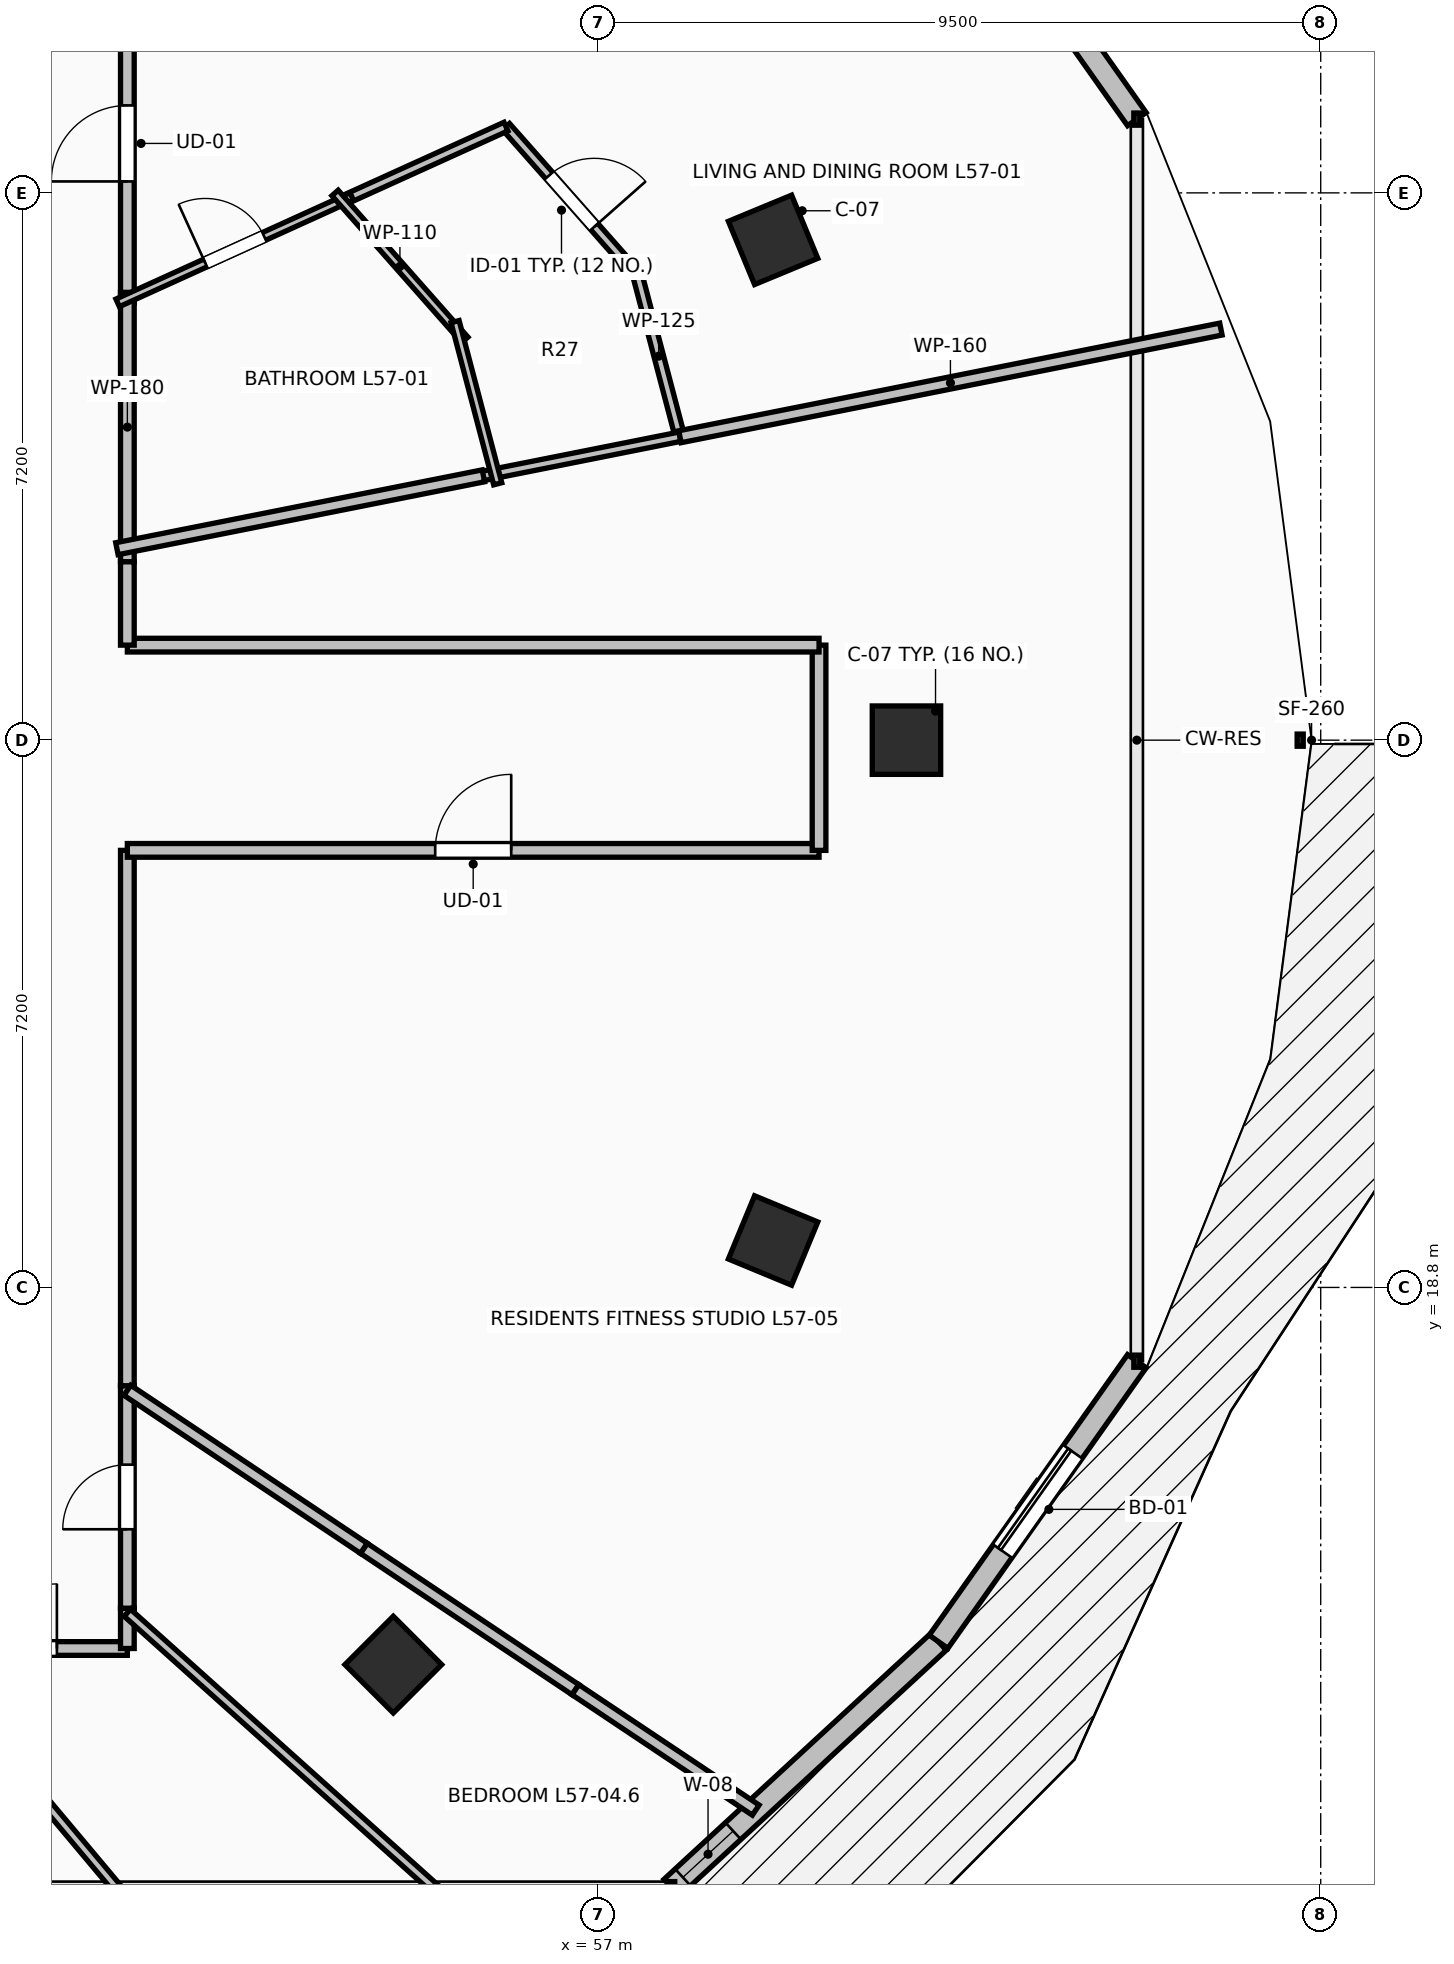
"""IFC4 building model, lengths in metres.
Left out: names, types, materials, properties, quantities, classifications, styles, units other than length and angle.
Written with IfcOpenShell. Run it as: python <this file> out.ifc"""

import sys

from ifc_helpers import new_model, si_unit, direction, frame, frame_2d, origin, origin_2d, place, context, subcontext, project, spatial, rectangle, extrude, element, fill, save


model = new_model("IFC4")
c1 = context("Model", 3, precision=1e-05, world=origin(), true_north=direction((0.0, 1.0)))
c2 = subcontext(c1, "Body", "Model", "MODEL_VIEW")
j1 = project(units=[si_unit("LENGTHUNIT", "METRE"), si_unit("PLANEANGLEUNIT", "RADIAN")], contexts=[c1])
p1 = place(None, origin())
s1 = spatial("IfcSite", under=j1, at=p1, CompositionType="ELEMENT")
p2 = place(p1, origin())
s2 = spatial("IfcBuilding", under=s1, at=p2, CompositionType="ELEMENT")
p3 = place(p2, frame((0.0, 0.0, 210.75)))
s3 = spatial("IfcBuildingStorey", under=s2, at=p3, CompositionType="ELEMENT", Elevation=210.75)
for number, where, z_axis, x_axis in (
    (1, (61.05, 26.0, 0.0), (0.0, 0.0, 1.0), (1.0, 0.0, 0.0)),
    (2, (59.295, 32.582, 0.0), (0.0, 0.0, 1.0), (0.924, 0.383, 0.0)),
    (3, (54.299, 13.838, 0.0), (0.0, 0.0, 1.0), (0.707, -0.707, 0.0)),
    (4, (59.295, 19.418, 0.0), (0.0, 0.0, 1.0), (0.924, -0.383, 0.0)),
):
    element("IfcColumn", number, at=place(p3, frame(where, z_axis=z_axis, x_axis=x_axis)), inside=s3, PredefinedType="COLUMN", context=c2, shape_type="SweptSolid", body=[
        extrude(rectangle(XDim=0.9, YDim=0.9, at=origin_2d()), origin(), (0.0, 0.0, 1.0), 3.55),
    ])
p4 = place(p3, frame((64.081, 34.17, 0.0), z_axis=(0.0, 0.0, 1.0), x_axis=(-0.577168747264, 0.81662490605, 0.0)))
e5 = element("IfcWall", 5, at=p4, inside=s3, PredefinedType="STANDARD", context=c2, shape_type="SweptSolid", body=[
    extrude(rectangle(XDim=4.52, YDim=0.3, at=frame_2d((2.26, 0.0))), origin(), (0.0, 0.0, 1.0), 3.29),
])
p5 = place(p3, frame((57.962, 10.903, 0.0), z_axis=(0.0, 0.0, 1.0), x_axis=(0.735359993374, 0.677676678177, 0.0)))
e6 = element("IfcWall", 6, at=p5, inside=s3, PredefinedType="STANDARD", context=c2, shape_type="SweptSolid", body=[
    extrude(rectangle(XDim=4.774, YDim=0.3, at=frame_2d((2.387, 0.0))), origin(), (0.0, 0.0, 1.0), 3.29),
])
p6 = place(p5, frame((0.2, 0.0, 0.85)))
e7 = element("IfcOpeningElement", 7, at=p6, cuts=e6, PredefinedType="OPENING", context=c2, shape_type="SweptSolid", body=[
    extrude(rectangle(XDim=0.9, YDim=1.8, at=frame_2d((0.45, 0.9))), frame((0.0, 0.165, 0.0), z_axis=(0.0, -1.0, 0.0), x_axis=(1.0, 0.0, 0.0)), (0.0, 0.0, 1.0), 0.33),
])
p7 = place(p3, frame((61.472, 14.139, 0.0), z_axis=(0.0, 0.0, 1.0), x_axis=(0.577168747264, 0.81662490605, 0.0)))
e8 = element("IfcWall", 8, at=p7, inside=s3, PredefinedType="STANDARD", context=c2, shape_type="SweptSolid", body=[
    extrude(rectangle(XDim=4.52, YDim=0.3, at=frame_2d((2.26, 0.0))), origin(), (0.0, 0.0, 1.0), 3.29),
])
p8 = place(p7, frame((1.46, 0.0, 0.0)))
e9 = element("IfcOpeningElement", 9, at=p8, cuts=e8, PredefinedType="OPENING", context=c2, shape_type="SweptSolid", body=[
    extrude(rectangle(XDim=1.6, YDim=2.3, at=frame_2d((0.8, 1.15))), frame((0.0, 0.165, 0.0), z_axis=(0.0, -1.0, 0.0), x_axis=(1.0, 0.0, 0.0)), (0.0, 0.0, 1.0), 0.33),
])
p9 = place(p3, frame((50.8, 31.751, 0.0), z_axis=(0.0, 0.0, 1.0), x_axis=(0.0, 1.0, 0.0)))
e10 = element("IfcWall", 10, at=p9, inside=s3, PredefinedType="PARTITIONING", context=c2, shape_type="SweptSolid", body=[
    extrude(rectangle(XDim=4.199, YDim=0.18, at=frame_2d((2.1, 0.0))), origin(), (0.0, 0.0, 1.0), 2.482),
])
p10 = place(p9, frame((1.6, 0.0, 0.0)))
e11 = element("IfcOpeningElement", 11, at=p10, cuts=e10, PredefinedType="OPENING", context=c2, shape_type="SweptSolid", body=[
    extrude(rectangle(XDim=1.0, YDim=2.15, at=frame_2d((0.5, 1.075))), frame((0.0, 0.105, 0.0), z_axis=(0.0, -1.0, 0.0), x_axis=(1.0, 0.0, 0.0)), (0.0, 0.0, 1.0), 0.21),
])
p11 = place(p3, frame((50.8, 28.346, 0.0), z_axis=(0.0, 0.0, 1.0), x_axis=(0.0, 1.0, 0.0)))
e12 = element("IfcWall", 12, at=p11, inside=s3, PredefinedType="PARTITIONING", context=c2, shape_type="SweptSolid", body=[
    extrude(rectangle(XDim=3.545, YDim=0.18, at=frame_2d((1.772, 0.0))), origin(), (0.0, 0.0, 1.0), 3.29),
])
p12 = place(p3, frame((48.096, 14.05, 0.0), z_axis=(0.0, 0.0, 1.0), x_axis=(1.0, 0.0, 0.0)))
e13 = element("IfcWall", 13, at=p12, inside=s3, PredefinedType="PARTITIONING", context=c2, shape_type="SweptSolid", body=[
    extrude(rectangle(XDim=2.704, YDim=0.18, at=frame_2d((1.352, 0.0))), origin(), (0.0, 0.0, 1.0), 2.482),
])
p13 = place(p12, frame((0.927, 0.0, 0.0)))
e14 = element("IfcOpeningElement", 14, at=p13, cuts=e13, PredefinedType="OPENING", context=c2, shape_type="SweptSolid", body=[
    extrude(rectangle(XDim=0.85, YDim=2.1, at=frame_2d((0.425, 1.05))), frame((0.0, 0.105, 0.0), z_axis=(0.0, -1.0, 0.0), x_axis=(1.0, 0.0, 0.0)), (0.0, 0.0, 1.0), 0.21),
])
p14 = place(p3, frame((50.8, 14.05, 0.0), z_axis=(0.0, 0.0, 1.0), x_axis=(0.0, 1.0, 0.0)))
e15 = element("IfcWall", 15, at=p14, inside=s3, PredefinedType="PARTITIONING", context=c2, shape_type="SweptSolid", body=[
    extrude(rectangle(XDim=0.53, YDim=0.18, at=frame_2d((0.265, 0.0))), origin(), (0.0, 0.0, 1.0), 2.936),
])
p15 = place(p3, frame((50.8, 14.58, 0.0), z_axis=(0.0, 0.0, 1.0), x_axis=(0.0, 1.0, 0.0)))
e16 = element("IfcWall", 16, at=p15, inside=s3, PredefinedType="PARTITIONING", context=c2, shape_type="SweptSolid", body=[
    extrude(rectangle(XDim=2.927, YDim=0.18, at=frame_2d((1.463, 0.0))), origin(), (0.0, 0.0, 1.0), 2.482),
])
p16 = place(p15, frame((1.039, 0.0, 0.0)))
e17 = element("IfcOpeningElement", 17, at=p16, cuts=e16, PredefinedType="OPENING", context=c2, shape_type="SweptSolid", body=[
    extrude(rectangle(XDim=0.85, YDim=2.1, at=frame_2d((0.425, 1.05))), frame((0.0, 0.105, 0.0), z_axis=(0.0, -1.0, 0.0), x_axis=(1.0, 0.0, 0.0)), (0.0, 0.0, 1.0), 0.21),
])
p17 = place(p3, frame((50.8, 17.507, 0.0), z_axis=(0.0, 0.0, 1.0), x_axis=(0.0, 1.0, 0.0)))
e18 = element("IfcWall", 18, at=p17, inside=s3, PredefinedType="PARTITIONING", context=c2, shape_type="SweptSolid", body=[
    extrude(rectangle(XDim=7.043, YDim=0.18, at=frame_2d((3.521, 0.0))), origin(), (0.0, 0.0, 1.0), 2.979),
])
p18 = place(p3, frame((50.8, 24.55, 0.0), z_axis=(0.0, 0.0, 1.0), x_axis=(1.0, 0.0, 0.0)))
e19 = element("IfcWall", 19, at=p18, inside=s3, PredefinedType="PARTITIONING", context=c2, shape_type="SweptSolid", body=[
    extrude(rectangle(XDim=9.1, YDim=0.18, at=frame_2d((4.55, 0.0))), origin(), (0.0, 0.0, 1.0), 2.482),
])
p19 = place(p18, frame((4.05, 0.0, 0.0)))
e20 = element("IfcOpeningElement", 20, at=p19, cuts=e19, PredefinedType="OPENING", context=c2, shape_type="SweptSolid", body=[
    extrude(rectangle(XDim=1.0, YDim=2.15, at=frame_2d((0.5, 1.075))), frame((0.0, 0.105, 0.0), z_axis=(0.0, -1.0, 0.0), x_axis=(1.0, 0.0, 0.0)), (0.0, 0.0, 1.0), 0.21),
])
p20 = place(p3, frame((59.9, 24.55, 0.0), z_axis=(0.0, 0.0, 1.0), x_axis=(0.0, 1.0, 0.0)))
e21 = element("IfcWall", 21, at=p20, inside=s3, PredefinedType="PARTITIONING", context=c2, shape_type="SweptSolid", body=[
    extrude(rectangle(XDim=2.7, YDim=0.18, at=frame_2d((1.35, 0.0))), origin(), (0.0, 0.0, 1.0), 2.482),
])
p21 = place(p3, frame((59.9, 27.25, 0.0), z_axis=(0.0, 0.0, 1.0), x_axis=(-1.0, 0.0, 0.0)))
e22 = element("IfcWall", 22, at=p21, inside=s3, PredefinedType="PARTITIONING", context=c2, shape_type="SweptSolid", body=[
    extrude(rectangle(XDim=9.1, YDim=0.18, at=frame_2d((4.55, 0.0))), origin(), (0.0, 0.0, 1.0), 2.482),
])
p22 = place(p3, frame((50.8, 27.25, 0.0), z_axis=(0.0, 0.0, 1.0), x_axis=(0.0, 1.0, 0.0)))
e23 = element("IfcWall", 23, at=p22, inside=s3, PredefinedType="PARTITIONING", context=c2, shape_type="SweptSolid", body=[
    extrude(rectangle(XDim=1.096, YDim=0.18, at=frame_2d((0.548, 0.0))), origin(), (0.0, 0.0, 1.0), 2.482),
])
p23 = place(p3, frame((55.781, 34.072, 0.0), z_axis=(0.0, 0.0, 1.0), x_axis=(0.661961245166, -0.749538064343, 0.0)))
e24 = element("IfcWall", 24, at=p23, inside=s3, PredefinedType="PARTITIONING", context=c2, shape_type="SweptSolid", body=[
    extrude(rectangle(XDim=2.615, YDim=0.125, at=frame_2d((1.308, 0.0))), origin(), (0.0, 0.0, 1.0), 2.482),
])
p24 = place(p23, frame((0.857, 0.0, 0.0)))
e25 = element("IfcOpeningElement", 25, at=p24, cuts=e24, PredefinedType="OPENING", context=c2, shape_type="SweptSolid", body=[
    extrude(rectangle(XDim=0.9, YDim=2.1, at=frame_2d((0.45, 1.05))), frame((0.0, 0.077, 0.0), z_axis=(0.0, -1.0, 0.0), x_axis=(1.0, 0.0, 0.0)), (0.0, 0.0, 1.0), 0.155),
])
p25 = place(p3, frame((57.512, 32.112, 0.0), z_axis=(0.0, 0.0, 1.0), x_axis=(0.254570039115, -0.967054339314, 0.0)))
e26 = element("IfcWall", 26, at=p25, inside=s3, PredefinedType="PARTITIONING", context=c2, shape_type="SweptSolid", body=[
    extrude(rectangle(XDim=2.192, YDim=0.125, at=frame_2d((1.096, 0.0))), origin(), (0.0, 0.0, 1.0), 3.29),
])
p26 = place(p3, frame((58.07, 29.992, 0.0), z_axis=(0.0, 0.0, 1.0), x_axis=(-0.98076287284, -0.19520293865, 0.0)))
e27 = element("IfcWall", 27, at=p26, inside=s3, PredefinedType="PARTITIONING", context=c2, shape_type="SweptSolid", body=[
    extrude(rectangle(XDim=2.777, YDim=0.125, at=frame_2d((1.388, 0.0))), origin(), (0.0, 0.0, 1.0), 2.936),
])
p27 = place(p3, frame((53.625, 33.094, 0.0), z_axis=(0.0, 0.0, 1.0), x_axis=(0.910680528551, 0.413111334773, 0.0)))
e28 = element("IfcWall", 28, at=p27, inside=s3, PredefinedType="PARTITIONING", context=c2, shape_type="SweptSolid", body=[
    extrude(rectangle(XDim=2.367, YDim=0.125, at=frame_2d((1.184, 0.0))), origin(), (0.0, 0.0, 1.0), 2.482),
])
p28 = place(p3, frame((50.673, 31.753, 0.0), z_axis=(0.0, 0.0, 1.0), x_axis=(0.910504846956, 0.413498396212, 0.0)))
e29 = element("IfcWall", 29, at=p28, inside=s3, PredefinedType="PARTITIONING", context=c2, shape_type="SweptSolid", body=[
    extrude(rectangle(XDim=3.383, YDim=0.11, at=frame_2d((1.691, 0.0))), origin(), (0.0, 0.0, 1.0), 2.482),
])
p29 = place(p28, frame((1.266, 0.0, 0.0)))
e30 = element("IfcOpeningElement", 30, at=p29, cuts=e29, PredefinedType="OPENING", context=c2, shape_type="SweptSolid", body=[
    extrude(rectangle(XDim=0.85, YDim=2.1, at=frame_2d((0.425, 1.05))), frame((0.0, 0.07, 0.0), z_axis=(0.0, -1.0, 0.0), x_axis=(1.0, 0.0, 0.0)), (0.0, 0.0, 1.0), 0.14),
])
p30 = place(p3, frame((58.07, 29.992, 0.0), z_axis=(0.0, 0.0, 1.0), x_axis=(0.980769147175, 0.19517141171, 0.0)))
e31 = element("IfcWall", 31, at=p30, inside=s3, PredefinedType="PARTITIONING", context=c2, shape_type="SweptSolid", body=[
    extrude(rectangle(XDim=7.257, YDim=0.16, at=frame_2d((3.628, 0.0))), origin(), (0.0, 0.0, 1.0), 2.824),
])
p31 = place(p3, frame((53.532, 33.199, 0.0), z_axis=(0.0, 0.0, 1.0), x_axis=(0.662069232061, -0.749442680902, 0.0)))
e32 = element("IfcWall", 32, at=p31, inside=s3, PredefinedType="PARTITIONING", context=c2, shape_type="SweptSolid", body=[
    extrude(rectangle(XDim=2.579, YDim=0.11, at=frame_2d((1.29, 0.0))), origin(), (0.0, 0.0, 1.0), 2.482),
])
p32 = place(p3, frame((55.111, 31.506, 0.0), z_axis=(0.0, 0.0, 1.0), x_axis=(0.254389812051, -0.967101764823, 0.0)))
e33 = element("IfcWall", 33, at=p32, inside=s3, PredefinedType="PARTITIONING", context=c2, shape_type="SweptSolid", body=[
    extrude(rectangle(XDim=2.206, YDim=0.11, at=frame_2d((1.103, 0.0))), origin(), (0.0, 0.0, 1.0), 3.29),
])
p33 = place(p3, frame((50.663, 28.519, 0.0), z_axis=(0.0, 0.0, 1.0), x_axis=(0.980809211653, 0.194969972909, 0.0)))
e34 = element("IfcWall", 34, at=p33, inside=s3, PredefinedType="PARTITIONING", context=c2, shape_type="SweptSolid", body=[
    extrude(rectangle(XDim=4.916, YDim=0.16, at=frame_2d((2.458, 0.0))), origin(), (0.0, 0.0, 1.0), 2.979),
])
p34 = place(p3, frame((49.957, 6.743, 0.0), z_axis=(0.0, 0.0, 1.0), x_axis=(-0.527501342892, 0.849554196769, 0.0)))
e35 = element("IfcWall", 35, at=p34, inside=s3, PredefinedType="PARTITIONING", context=c2, shape_type="SweptSolid", body=[
    extrude(rectangle(XDim=8.601, YDim=0.125, at=frame_2d((4.301, 0.0))), origin(), (0.0, 0.0, 1.0), 2.482),
])
p35 = place(p3, frame((53.083, 8.009, 0.0), z_axis=(0.0, 0.0, 1.0), x_axis=(-0.642484403916, 0.766298760749, 0.0)))
e36 = element("IfcWall", 36, at=p35, inside=s3, PredefinedType="PARTITIONING", context=c2, shape_type="SweptSolid", body=[
    extrude(rectangle(XDim=7.883, YDim=0.125, at=frame_2d((3.942, 0.0))), origin(), (0.0, 0.0, 1.0), 2.482),
])
p36 = place(p3, frame((56.111, 9.757, 0.0), z_axis=(0.0, 0.0, 1.0), x_axis=(-0.744477346253, 0.667647722168, 0.0)))
e37 = element("IfcWall", 37, at=p36, inside=s3, PredefinedType="PARTITIONING", context=c2, shape_type="SweptSolid", body=[
    extrude(rectangle(XDim=7.134, YDim=0.125, at=frame_2d((3.567, 0.0))), origin(), (0.0, 0.0, 1.0), 2.824),
])
p37 = place(p3, frame((56.695, 13.508, 0.0), z_axis=(0.0, 0.0, 1.0), x_axis=(-0.831533913479, 0.55547398745, 0.0)))
e38 = element("IfcWall", 38, at=p37, inside=s3, PredefinedType="PARTITIONING", context=c2, shape_type="SweptSolid", body=[
    extrude(rectangle(XDim=3.348, YDim=0.16, at=frame_2d((1.674, 0.0))), origin(), (0.0, 0.0, 1.0), 2.824),
])
p38 = place(p3, frame((53.911, 15.368, 0.0), z_axis=(0.0, 0.0, 1.0), x_axis=(-0.83140728108, 0.55566350696, 0.0)))
e39 = element("IfcWall", 39, at=p38, inside=s3, PredefinedType="PARTITIONING", context=c2, shape_type="SweptSolid", body=[
    extrude(rectangle(XDim=3.742, YDim=0.16, at=frame_2d((1.871, 0.0))), origin(), (0.0, 0.0, 1.0), 2.936),
])
p39 = place(p3, frame((59.067, 11.924, 0.0), z_axis=(0.0, 0.0, 1.0), x_axis=(-0.831602270354, 0.555371644885, 0.0)))
e40 = element("IfcWall", 40, at=p39, inside=s3, PredefinedType="PARTITIONING", context=c2, shape_type="SweptSolid", body=[
    extrude(rectangle(XDim=2.852, YDim=0.16, at=frame_2d((1.426, 0.0))), origin(), (0.0, 0.0, 1.0), 3.29),
])
p40 = place(p8, origin())
e41 = element("IfcDoor", 41, at=p40, inside=s3, OperationType="SLIDING_TO_LEFT", PredefinedType="DOOR", context=c2, shape_type="SweptSolid", body=[
    extrude(rectangle(XDim=1.6, YDim=2.3, at=frame_2d((0.8, 1.15))), frame((0.0, 0.025, 0.0), z_axis=(0.0, -1.0, 0.0), x_axis=(1.0, 0.0, 0.0)), (0.0, 0.0, 1.0), 0.05),
])
fill(e9, e41)
p41 = place(p6, origin())
e42 = element("IfcWindow", 42, at=p41, inside=s3, PartitioningType="SINGLE_PANEL", PredefinedType="WINDOW", context=c2, shape_type="SweptSolid", body=[
    extrude(rectangle(XDim=0.9, YDim=1.8, at=frame_2d((0.45, 0.9))), frame((0.0, 0.03, 0.0), z_axis=(0.0, -1.0, 0.0), x_axis=(1.0, 0.0, 0.0)), (0.0, 0.0, 1.0), 0.06),
])
fill(e7, e42)
p42 = place(p10, origin())
e43 = element("IfcDoor", 43, at=p42, inside=s3, OperationType="SINGLE_SWING_LEFT", PredefinedType="DOOR", context=c2, shape_type="SweptSolid", body=[
    extrude(rectangle(XDim=1.0, YDim=2.15, at=frame_2d((0.5, 1.075))), frame((0.0, 0.025, 0.0), z_axis=(0.0, -1.0, 0.0), x_axis=(1.0, 0.0, 0.0)), (0.0, 0.0, 1.0), 0.05),
])
fill(e11, e43)
p43 = place(p19, origin())
e44 = element("IfcDoor", 44, at=p43, inside=s3, OperationType="SINGLE_SWING_RIGHT", PredefinedType="DOOR", context=c2, shape_type="SweptSolid", body=[
    extrude(rectangle(XDim=1.0, YDim=2.15, at=frame_2d((0.5, 1.075))), frame((0.0, 0.025, 0.0), z_axis=(0.0, -1.0, 0.0), x_axis=(1.0, 0.0, 0.0)), (0.0, 0.0, 1.0), 0.05),
])
fill(e20, e44)
p44 = place(p24, origin())
e45 = element("IfcDoor", 45, at=p44, inside=s3, OperationType="SINGLE_SWING_RIGHT", PredefinedType="DOOR", context=c2, shape_type="SweptSolid", body=[
    extrude(rectangle(XDim=0.9, YDim=2.1, at=frame_2d((0.45, 1.05))), frame((0.0, 0.025, 0.0), z_axis=(0.0, -1.0, 0.0), x_axis=(1.0, 0.0, 0.0)), (0.0, 0.0, 1.0), 0.05),
])
fill(e25, e45)
p45 = place(p29, origin())
e46 = element("IfcDoor", 46, at=p45, inside=s3, OperationType="SINGLE_SWING_LEFT", PredefinedType="DOOR", context=c2, shape_type="SweptSolid", body=[
    extrude(rectangle(XDim=0.85, YDim=2.1, at=frame_2d((0.425, 1.05))), frame((0.0, 0.025, 0.0), z_axis=(0.0, -1.0, 0.0), x_axis=(1.0, 0.0, 0.0)), (0.0, 0.0, 1.0), 0.05),
])
fill(e30, e46)
p46 = place(p13, origin())
e47 = element("IfcDoor", 47, at=p46, inside=s3, OperationType="SINGLE_SWING_RIGHT", PredefinedType="DOOR", context=c2, shape_type="SweptSolid", body=[
    extrude(rectangle(XDim=0.85, YDim=2.1, at=frame_2d((0.425, 1.05))), frame((0.0, 0.025, 0.0), z_axis=(0.0, -1.0, 0.0), x_axis=(1.0, 0.0, 0.0)), (0.0, 0.0, 1.0), 0.05),
])
fill(e14, e47)
p47 = place(p16, origin())
e48 = element("IfcDoor", 48, at=p47, inside=s3, OperationType="SINGLE_SWING_LEFT", PredefinedType="DOOR", context=c2, shape_type="SweptSolid", body=[
    extrude(rectangle(XDim=0.85, YDim=2.1, at=frame_2d((0.425, 1.05))), frame((0.0, 0.025, 0.0), z_axis=(0.0, -1.0, 0.0), x_axis=(1.0, 0.0, 0.0)), (0.0, 0.0, 1.0), 0.05),
])
fill(e17, e48)
save(model, sys.argv[1])
